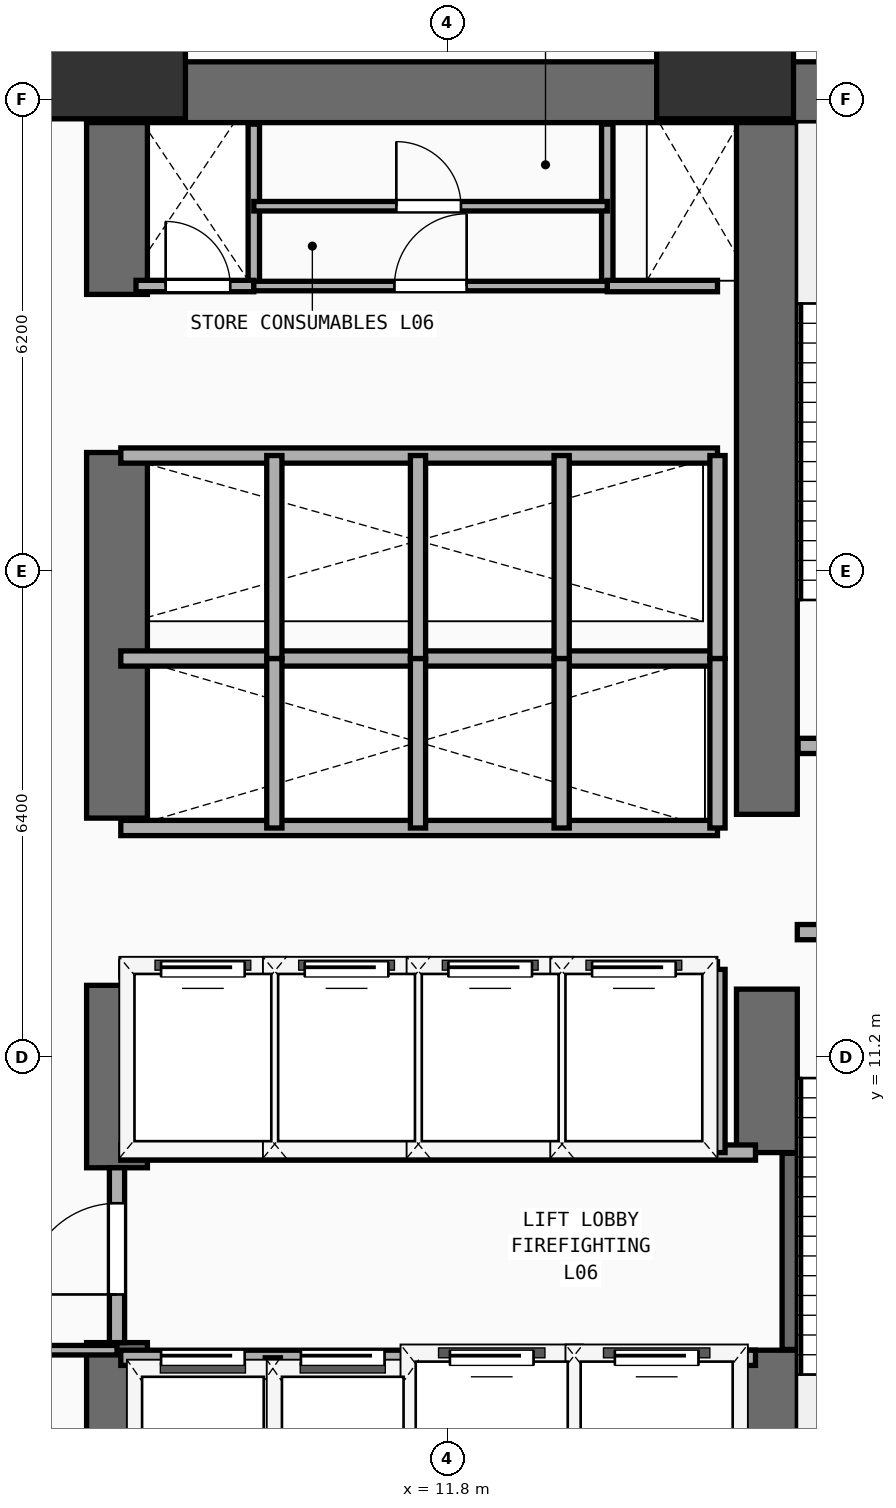
"""IFC4 building model, lengths in metres.
Left out: names, types, materials, properties, quantities, classifications, styles, units other than length and angle.
Written with IfcOpenShell. Run it as: python <this file> out.ifc"""

import sys

from ifc_helpers import new_model, si_unit, direction, frame, frame_2d, origin, origin_2d, place, context, subcontext, project, spatial, rectangle, extrude, element, fill, save


model = new_model("IFC4")
c1 = context("Model", 3, precision=1e-05, world=origin(), true_north=direction((0.0, 1.0)))
c2 = subcontext(c1, "Body", "Model", "MODEL_VIEW")
j1 = project(units=[si_unit("LENGTHUNIT", "METRE"), si_unit("PLANEANGLEUNIT", "RADIAN")], contexts=[c1])
p1 = place(None, origin())
s1 = spatial("IfcSite", under=j1, at=p1, CompositionType="ELEMENT")
p2 = place(p1, origin())
s2 = spatial("IfcBuilding", under=s1, at=p2, CompositionType="ELEMENT")
p3 = place(p2, frame((0.0, 0.0, 24.8)))
s3 = spatial("IfcBuildingStorey", under=s2, at=p3, CompositionType="ELEMENT", Elevation=24.8)
p4 = place(p3, frame((7.05, 23.9, 0.0), z_axis=(0.0, 0.0, 1.0), x_axis=(1.0, 0.0, 0.0)))
e1 = element("IfcWall", 1, at=p4, inside=s3, PredefinedType="SHEAR", context=c2, shape_type="SweptSolid", body=[
    extrude(rectangle(XDim=14.15, YDim=0.8, at=frame_2d((7.075, 0.0))), origin(), (0.0, 0.0, 1.0), 4.35),
])
p5 = place(p3, frame((7.45, 4.65, 0.0), z_axis=(0.0, 0.0, 1.0), x_axis=(0.0, 1.0, 0.0)))
e2 = element("IfcWall", 2, at=p5, inside=s3, PredefinedType="SHEAR", context=c2, shape_type="SweptSolid", body=[
    extrude(rectangle(XDim=2.8, YDim=0.8, at=frame_2d((1.4, 0.0))), origin(), (0.0, 0.0, 1.0), 4.35),
])
p6 = place(p3, frame((7.45, 9.75, 0.0), z_axis=(0.0, 0.0, 1.0), x_axis=(0.0, 1.0, 0.0)))
e3 = element("IfcWall", 3, at=p6, inside=s3, PredefinedType="SHEAR", context=c2, shape_type="SweptSolid", body=[
    extrude(rectangle(XDim=2.4, YDim=0.8, at=frame_2d((1.2, 0.0))), origin(), (0.0, 0.0, 1.0), 4.35),
])
p7 = place(p3, frame((7.45, 14.35, 0.0), z_axis=(0.0, 0.0, 1.0), x_axis=(0.0, 1.0, 0.0)))
e4 = element("IfcWall", 4, at=p7, inside=s3, PredefinedType="SHEAR", context=c2, shape_type="SweptSolid", body=[
    extrude(rectangle(XDim=4.81, YDim=0.8, at=frame_2d((2.405, 0.0))), origin(), (0.0, 0.0, 1.0), 4.35),
])
p8 = place(p3, frame((7.45, 21.24, 0.0), z_axis=(0.0, 0.0, 1.0), x_axis=(0.0, 1.0, 0.0)))
e5 = element("IfcWall", 5, at=p8, inside=s3, PredefinedType="SHEAR", context=c2, shape_type="SweptSolid", body=[
    extrude(rectangle(XDim=2.26, YDim=0.8, at=frame_2d((1.13, 0.0))), origin(), (0.0, 0.0, 1.0), 4.35),
])
p9 = place(p3, frame((16.0, 4.65, 0.0), z_axis=(0.0, 0.0, 1.0), x_axis=(0.0, 1.0, 0.0)))
e6 = element("IfcWall", 6, at=p9, inside=s3, PredefinedType="SHEAR", context=c2, shape_type="SweptSolid", body=[
    extrude(rectangle(XDim=2.7, YDim=0.8, at=frame_2d((1.35, 0.0))), origin(), (0.0, 0.0, 1.0), 4.35),
])
p10 = place(p3, frame((16.0, 9.95, 0.0), z_axis=(0.0, 0.0, 1.0), x_axis=(0.0, 1.0, 0.0)))
e7 = element("IfcWall", 7, at=p10, inside=s3, PredefinedType="SHEAR", context=c2, shape_type="SweptSolid", body=[
    extrude(rectangle(XDim=2.15, YDim=0.8, at=frame_2d((1.075, 0.0))), origin(), (0.0, 0.0, 1.0), 4.35),
])
p11 = place(p3, frame((16.0, 14.4, 0.0), z_axis=(0.0, 0.0, 1.0), x_axis=(0.0, 1.0, 0.0)))
e8 = element("IfcWall", 8, at=p11, inside=s3, PredefinedType="SHEAR", context=c2, shape_type="SweptSolid", body=[
    extrude(rectangle(XDim=9.1, YDim=0.8, at=frame_2d((4.55, 0.0))), origin(), (0.0, 0.0, 1.0), 4.35),
])
for number, where, z_axis, x_axis in (
    (9, (7.45, 24.45, 0.0), (0.0, 0.0, 1.0), (1.0, 0.0, 0.0)),
    (10, (15.45, 24.45, 0.0), (0.0, 0.0, 1.0), (1.0, 0.0, 0.0)),
):
    element("IfcColumn", number, at=place(p3, frame(where, z_axis=z_axis, x_axis=x_axis)), inside=s3, PredefinedType="COLUMN", context=c2, shape_type="SweptSolid", body=[
        extrude(rectangle(XDim=1.8, YDim=1.8, at=origin_2d()), origin(), (0.0, 0.0, 1.0), 4.35),
    ])
p12 = place(p3, frame((16.3, 7.36, 0.0), z_axis=(0.0, 0.0, 1.0), x_axis=(0.0, 1.0, 0.0)))
e11 = element("IfcWall", 11, at=p12, inside=s3, PredefinedType="SHEAR", context=c2, shape_type="SweptSolid", body=[
    extrude(rectangle(XDim=2.58, YDim=0.2, at=frame_2d((1.29, 0.0))), origin(), (0.0, 0.0, 1.0), 4.35),
])
p13 = place(p3, frame((16.4, 12.85, 0.0), z_axis=(0.0, 0.0, 1.0), x_axis=(1.0, 0.0, 0.0)))
e12 = element("IfcWall", 12, at=p13, inside=s3, PredefinedType="PARTITIONING", context=c2, shape_type="SweptSolid", body=[
    extrude(rectangle(XDim=3.96, YDim=0.2, at=frame_2d((1.98, 0.0))), origin(), (0.0, 0.0, 1.0), 4.35),
])
p14 = place(p13, frame((1.304, 0.0, 0.0)))
e13 = element("IfcOpeningElement", 13, at=p14, cuts=e12, PredefinedType="OPENING", context=c2, shape_type="SweptSolid", body=[
    extrude(rectangle(XDim=1.1, YDim=2.2, at=frame_2d((0.55, 1.1))), frame((0.0, 0.11, 0.0), z_axis=(0.0, -1.0, 0.0), x_axis=(1.0, 0.0, 0.0)), (0.0, 0.0, 1.0), 0.22),
])
p15 = place(p3, frame((16.41, 15.3, 0.0), z_axis=(0.0, 0.0, 1.0), x_axis=(1.0, 0.0, 0.0)))
e14 = element("IfcWall", 14, at=p15, inside=s3, PredefinedType="PARTITIONING", context=c2, shape_type="SweptSolid", body=[
    extrude(rectangle(XDim=3.95, YDim=0.2, at=frame_2d((1.975, 0.0))), origin(), (0.0, 0.0, 1.0), 4.35),
])
p16 = place(p15, frame((1.294, 0.0, 0.0)))
e15 = element("IfcOpeningElement", 15, at=p16, cuts=e14, PredefinedType="OPENING", context=c2, shape_type="SweptSolid", body=[
    extrude(rectangle(XDim=1.1, YDim=2.2, at=frame_2d((0.55, 1.1))), frame((0.0, 0.11, 0.0), z_axis=(0.0, -1.0, 0.0), x_axis=(1.0, 0.0, 0.0)), (0.0, 0.0, 1.0), 0.22),
])
p17 = place(p3, frame((7.5, 7.25, 0.0), z_axis=(0.0, 0.0, 1.0), x_axis=(1.0, 0.0, 0.0)))
e16 = element("IfcWall", 16, at=p17, inside=s3, PredefinedType="PARTITIONING", context=c2, shape_type="SweptSolid", body=[
    extrude(rectangle(XDim=8.35, YDim=0.2, at=frame_2d((4.175, 0.0))), origin(), (0.0, 0.0, 1.0), 4.35),
])
p18 = place(p17, frame((0.53, 0.0, 0.0)))
e17 = element("IfcOpeningElement", 17, at=p18, cuts=e16, PredefinedType="OPENING", context=c2, shape_type="SweptSolid", body=[
    extrude(rectangle(XDim=1.1, YDim=2.2, at=frame_2d((0.55, 1.1))), frame((0.0, 0.11, 0.0), z_axis=(0.0, -1.0, 0.0), x_axis=(1.0, 0.0, 0.0)), (0.0, 0.0, 1.0), 0.22),
])
p19 = place(p17, frame((2.37, 0.0, 0.0)))
e18 = element("IfcOpeningElement", 18, at=p19, cuts=e16, PredefinedType="OPENING", context=c2, shape_type="SweptSolid", body=[
    extrude(rectangle(XDim=1.1, YDim=2.2, at=frame_2d((0.55, 1.1))), frame((0.0, 0.11, 0.0), z_axis=(0.0, -1.0, 0.0), x_axis=(1.0, 0.0, 0.0)), (0.0, 0.0, 1.0), 0.22),
])
p20 = place(p17, frame((4.33, 0.0, 0.0)))
e19 = element("IfcOpeningElement", 19, at=p20, cuts=e16, PredefinedType="OPENING", context=c2, shape_type="SweptSolid", body=[
    extrude(rectangle(XDim=1.1, YDim=2.2, at=frame_2d((0.55, 1.1))), frame((0.0, 0.11, 0.0), z_axis=(0.0, -1.0, 0.0), x_axis=(1.0, 0.0, 0.0)), (0.0, 0.0, 1.0), 0.22),
])
p21 = place(p17, frame((6.5, 0.0, 0.0)))
e20 = element("IfcOpeningElement", 20, at=p21, cuts=e16, PredefinedType="OPENING", context=c2, shape_type="SweptSolid", body=[
    extrude(rectangle(XDim=1.1, YDim=2.2, at=frame_2d((0.55, 1.1))), frame((0.0, 0.11, 0.0), z_axis=(0.0, -1.0, 0.0), x_axis=(1.0, 0.0, 0.0)), (0.0, 0.0, 1.0), 0.22),
])
p22 = place(p3, frame((7.5, 9.95, 0.0), z_axis=(0.0, 0.0, 1.0), x_axis=(1.0, 0.0, 0.0)))
e21 = element("IfcWall", 21, at=p22, inside=s3, PredefinedType="PARTITIONING", context=c2, shape_type="SweptSolid", body=[
    extrude(rectangle(XDim=8.35, YDim=0.2, at=frame_2d((4.175, 0.0))), origin(), (0.0, 0.0, 1.0), 4.35),
])
for number, where, z_axis, x_axis in (
    (22, (9.5, 4.45, 0.0), (0.0, 0.0, 1.0), (0.0, 1.0, 0.0)),
    (23, (11.36, 4.45, 0.0), (0.0, 0.0, 1.0), (0.0, 1.0, 0.0)),
    (24, (13.46, 4.45, 0.0), (0.0, 0.0, 1.0), (0.0, 1.0, 0.0)),
):
    element("IfcWall", number, at=place(p3, frame(where, z_axis=z_axis, x_axis=x_axis)), inside=s3, PredefinedType="PARTITIONING", context=c2, shape_type="SweptSolid", body=[
        extrude(rectangle(XDim=2.8, YDim=0.2, at=frame_2d((1.4, 0.0))), origin(), (0.0, 0.0, 1.0), 4.35),
    ])
p23 = place(p3, frame((7.45, 7.45, 0.0), z_axis=(0.0, 0.0, 1.0), x_axis=(0.0, 1.0, 0.0)))
e25 = element("IfcWall", 25, at=p23, inside=s3, PredefinedType="PARTITIONING", context=c2, shape_type="SweptSolid", body=[
    extrude(rectangle(XDim=2.3, YDim=0.2, at=frame_2d((1.15, 0.0))), origin(), (0.0, 0.0, 1.0), 3.13),
])
p24 = place(p23, frame((0.633, 0.0, 0.0)))
e26 = element("IfcOpeningElement", 26, at=p24, cuts=e25, PredefinedType="OPENING", context=c2, shape_type="SweptSolid", body=[
    extrude(rectangle(XDim=1.2, YDim=2.25, at=frame_2d((0.6, 1.125))), frame((0.0, 0.11, 0.0), z_axis=(0.0, -1.0, 0.0), x_axis=(1.0, 0.0, 0.0)), (0.0, 0.0, 1.0), 0.22),
])
p25 = place(p3, frame((7.5, 12.36, 0.0), z_axis=(0.0, 0.0, 1.0), x_axis=(1.0, 0.0, 0.0)))
e27 = element("IfcWall", 27, at=p25, inside=s3, PredefinedType="PARTITIONING", context=c2, shape_type="SweptSolid", body=[
    extrude(rectangle(XDim=7.85, YDim=0.2, at=frame_2d((3.925, 0.0))), origin(), (0.0, 0.0, 1.0), 4.35),
])
p26 = place(p25, frame((0.53, 0.0, 0.0)))
e28 = element("IfcOpeningElement", 28, at=p26, cuts=e27, PredefinedType="OPENING", context=c2, shape_type="SweptSolid", body=[
    extrude(rectangle(XDim=1.1, YDim=2.2, at=frame_2d((0.55, 1.1))), frame((0.0, 0.11, 0.0), z_axis=(0.0, -1.0, 0.0), x_axis=(1.0, 0.0, 0.0)), (0.0, 0.0, 1.0), 0.22),
])
p27 = place(p25, frame((2.42, 0.0, 0.0)))
e29 = element("IfcOpeningElement", 29, at=p27, cuts=e27, PredefinedType="OPENING", context=c2, shape_type="SweptSolid", body=[
    extrude(rectangle(XDim=1.1, YDim=2.2, at=frame_2d((0.55, 1.1))), frame((0.0, 0.11, 0.0), z_axis=(0.0, -1.0, 0.0), x_axis=(1.0, 0.0, 0.0)), (0.0, 0.0, 1.0), 0.22),
])
p28 = place(p25, frame((4.31, 0.0, 0.0)))
e30 = element("IfcOpeningElement", 30, at=p28, cuts=e27, PredefinedType="OPENING", context=c2, shape_type="SweptSolid", body=[
    extrude(rectangle(XDim=1.1, YDim=2.2, at=frame_2d((0.55, 1.1))), frame((0.0, 0.11, 0.0), z_axis=(0.0, -1.0, 0.0), x_axis=(1.0, 0.0, 0.0)), (0.0, 0.0, 1.0), 0.22),
])
p29 = place(p25, frame((6.2, 0.0, 0.0)))
e31 = element("IfcOpeningElement", 31, at=p29, cuts=e27, PredefinedType="OPENING", context=c2, shape_type="SweptSolid", body=[
    extrude(rectangle(XDim=1.1, YDim=2.2, at=frame_2d((0.55, 1.1))), frame((0.0, 0.11, 0.0), z_axis=(0.0, -1.0, 0.0), x_axis=(1.0, 0.0, 0.0)), (0.0, 0.0, 1.0), 0.22),
])
for number, where, z_axis, x_axis in (
    (32, (15.35, 9.95, 0.0), (0.0, 0.0, 1.0), (0.0, 1.0, 0.0)),
    (33, (9.52, 9.95, 0.0), (0.0, 0.0, 1.0), (0.0, 1.0, 0.0)),
    (34, (11.41, 9.95, 0.0), (0.0, 0.0, 1.0), (0.0, 1.0, 0.0)),
    (35, (13.3, 9.95, 0.0), (0.0, 0.0, 1.0), (0.0, 1.0, 0.0)),
):
    element("IfcWall", number, at=place(p3, frame(where, z_axis=z_axis, x_axis=x_axis)), inside=s3, PredefinedType="PARTITIONING", context=c2, shape_type="SweptSolid", body=[
        extrude(rectangle(XDim=2.41, YDim=0.2, at=frame_2d((1.205, 0.0))), origin(), (0.0, 0.0, 1.0), 4.35),
    ])
for number, where, z_axis, x_axis in (
    (36, (7.5, 14.22, 0.0), (0.0, 0.0, 1.0), (1.0, 0.0, 0.0)),
    (37, (7.5, 16.45, 0.0), (0.0, 0.0, 1.0), (1.0, 0.0, 0.0)),
):
    element("IfcWall", number, at=place(p3, frame(where, z_axis=z_axis, x_axis=x_axis)), inside=s3, PredefinedType="PARTITIONING", context=c2, shape_type="SweptSolid", body=[
        extrude(rectangle(XDim=7.85, YDim=0.2, at=frame_2d((3.925, 0.0))), origin(), (0.0, 0.0, 1.0), 4.35),
    ])
for number, where, z_axis, x_axis in (
    (38, (15.35, 14.22, 0.0), (0.0, 0.0, 1.0), (0.0, 1.0, 0.0)),
    (39, (9.52, 14.22, 0.0), (0.0, 0.0, 1.0), (0.0, 1.0, 0.0)),
    (40, (11.41, 14.22, 0.0), (0.0, 0.0, 1.0), (0.0, 1.0, 0.0)),
    (41, (13.3, 14.22, 0.0), (0.0, 0.0, 1.0), (0.0, 1.0, 0.0)),
):
    element("IfcWall", number, at=place(p3, frame(where, z_axis=z_axis, x_axis=x_axis)), inside=s3, PredefinedType="PARTITIONING", context=c2, shape_type="SweptSolid", body=[
        extrude(rectangle(XDim=2.23, YDim=0.2, at=frame_2d((1.115, 0.0))), origin(), (0.0, 0.0, 1.0), 4.35),
    ])
p30 = place(p3, frame((7.5, 19.12, 0.0), z_axis=(0.0, 0.0, 1.0), x_axis=(1.0, 0.0, 0.0)))
e42 = element("IfcWall", 42, at=p30, inside=s3, PredefinedType="PARTITIONING", context=c2, shape_type="SweptSolid", body=[
    extrude(rectangle(XDim=7.85, YDim=0.2, at=frame_2d((3.925, 0.0))), origin(), (0.0, 0.0, 1.0), 4.35),
])
for number, where, z_axis, x_axis in (
    (43, (15.35, 16.45, 0.0), (0.0, 0.0, 1.0), (0.0, 1.0, 0.0)),
    (44, (9.52, 16.45, 0.0), (0.0, 0.0, 1.0), (0.0, 1.0, 0.0)),
    (45, (11.41, 16.45, 0.0), (0.0, 0.0, 1.0), (0.0, 1.0, 0.0)),
    (46, (13.3, 16.45, 0.0), (0.0, 0.0, 1.0), (0.0, 1.0, 0.0)),
):
    element("IfcWall", number, at=place(p3, frame(where, z_axis=z_axis, x_axis=x_axis)), inside=s3, PredefinedType="PARTITIONING", context=c2, shape_type="SweptSolid", body=[
        extrude(rectangle(XDim=2.67, YDim=0.2, at=frame_2d((1.335, 0.0))), origin(), (0.0, 0.0, 1.0), 4.35),
    ])
for number, where, z_axis, x_axis in (
    (47, (9.25, 21.35, 0.0), (0.0, 0.0, 1.0), (0.0, 1.0, 0.0)),
    (48, (13.9, 21.35, 0.0), (0.0, 0.0, 1.0), (0.0, 1.0, 0.0)),
):
    element("IfcWall", number, at=place(p3, frame(where, z_axis=z_axis, x_axis=x_axis)), inside=s3, PredefinedType="PARTITIONING", context=c2, shape_type="SweptSolid", body=[
        extrude(rectangle(XDim=2.13, YDim=0.15, at=frame_2d((1.065, 0.0))), origin(), (0.0, 0.0, 1.0), 4.35),
    ])
p31 = place(p3, frame((7.7, 21.35, 0.0), z_axis=(0.0, 0.0, 1.0), x_axis=(1.0, 0.0, 0.0)))
e49 = element("IfcWall", 49, at=p31, inside=s3, PredefinedType="PARTITIONING", context=c2, shape_type="SweptSolid", body=[
    extrude(rectangle(XDim=1.55, YDim=0.15, at=frame_2d((0.775, 0.0))), origin(), (0.0, 0.0, 1.0), 4.35),
])
p32 = place(p31, frame((0.39, 0.0, 0.0)))
e50 = element("IfcOpeningElement", 50, at=p32, cuts=e49, PredefinedType="OPENING", context=c2, shape_type="SweptSolid", body=[
    extrude(rectangle(XDim=0.85, YDim=2.15, at=frame_2d((0.425, 1.075))), frame((0.0, 0.085, 0.0), z_axis=(0.0, -1.0, 0.0), x_axis=(1.0, 0.0, 0.0)), (0.0, 0.0, 1.0), 0.17),
])
p33 = place(p3, frame((13.9, 21.35, 0.0), z_axis=(0.0, 0.0, 1.0), x_axis=(1.0, 0.0, 0.0)))
e51 = element("IfcWall", 51, at=p33, inside=s3, PredefinedType="PARTITIONING", context=c2, shape_type="SweptSolid", body=[
    extrude(rectangle(XDim=1.45, YDim=0.15, at=frame_2d((0.725, 0.0))), origin(), (0.0, 0.0, 1.0), 4.35),
])
p34 = place(p3, frame((9.25, 21.35, 0.0), z_axis=(0.0, 0.0, 1.0), x_axis=(1.0, 0.0, 0.0)))
e52 = element("IfcWall", 52, at=p34, inside=s3, PredefinedType="PARTITIONING", context=c2, shape_type="SweptSolid", body=[
    extrude(rectangle(XDim=4.65, YDim=0.125, at=frame_2d((2.325, 0.0))), origin(), (0.0, 0.0, 1.0), 4.35),
])
p35 = place(p34, frame((1.85, 0.0, 0.0)))
e53 = element("IfcOpeningElement", 53, at=p35, cuts=e52, PredefinedType="OPENING", context=c2, shape_type="SweptSolid", body=[
    extrude(rectangle(XDim=0.95, YDim=2.15, at=frame_2d((0.475, 1.075))), frame((0.0, 0.073, 0.0), z_axis=(0.0, -1.0, 0.0), x_axis=(1.0, 0.0, 0.0)), (0.0, 0.0, 1.0), 0.145),
])
p36 = place(p3, frame((9.25, 22.4, 0.0), z_axis=(0.0, 0.0, 1.0), x_axis=(1.0, 0.0, 0.0)))
e54 = element("IfcWall", 54, at=p36, inside=s3, PredefinedType="PARTITIONING", context=c2, shape_type="SweptSolid", body=[
    extrude(rectangle(XDim=4.65, YDim=0.125, at=frame_2d((2.325, 0.0))), origin(), (0.0, 0.0, 1.0), 4.35),
])
p37 = place(p36, frame((1.875, 0.0, 0.0)))
e55 = element("IfcOpeningElement", 55, at=p37, cuts=e54, PredefinedType="OPENING", context=c2, shape_type="SweptSolid", body=[
    extrude(rectangle(XDim=0.85, YDim=2.15, at=frame_2d((0.425, 1.075))), frame((0.0, 0.073, 0.0), z_axis=(0.0, -1.0, 0.0), x_axis=(1.0, 0.0, 0.0)), (0.0, 0.0, 1.0), 0.145),
])
p38 = place(p3, frame((0.42, 7.35, 0.0), z_axis=(0.0, 0.0, 1.0), x_axis=(1.0, 0.0, 0.0)))
e56 = element("IfcWall", 56, at=p38, inside=s3, PredefinedType="PARTITIONING", context=c2, shape_type="SweptSolid", body=[
    extrude(rectangle(XDim=7.03, YDim=0.125, at=frame_2d((3.515, 0.0))), origin(), (0.0, 0.0, 1.0), 4.35),
])
p39 = place(p38, frame((4.78, 0.0, 0.0)))
e57 = element("IfcOpeningElement", 57, at=p39, cuts=e56, PredefinedType="OPENING", context=c2, shape_type="SweptSolid", body=[
    extrude(rectangle(XDim=0.95, YDim=2.15, at=frame_2d((0.475, 1.075))), frame((0.0, 0.073, 0.0), z_axis=(0.0, -1.0, 0.0), x_axis=(1.0, 0.0, 0.0)), (0.0, 0.0, 1.0), 0.145),
])
p40 = place(p18, origin())
e58 = element("IfcDoor", 58, at=p40, inside=s3, OperationType="SLIDING_TO_LEFT", PredefinedType="DOOR", context=c2, shape_type="SweptSolid", body=[
    extrude(rectangle(XDim=1.1, YDim=2.2, at=frame_2d((0.55, 1.1))), frame((0.0, 0.025, 0.0), z_axis=(0.0, -1.0, 0.0), x_axis=(1.0, 0.0, 0.0)), (0.0, 0.0, 1.0), 0.05),
])
fill(e17, e58)
p41 = place(p19, origin())
e59 = element("IfcDoor", 59, at=p41, inside=s3, OperationType="SLIDING_TO_LEFT", PredefinedType="DOOR", context=c2, shape_type="SweptSolid", body=[
    extrude(rectangle(XDim=1.1, YDim=2.2, at=frame_2d((0.55, 1.1))), frame((0.0, 0.025, 0.0), z_axis=(0.0, -1.0, 0.0), x_axis=(1.0, 0.0, 0.0)), (0.0, 0.0, 1.0), 0.05),
])
fill(e18, e59)
p42 = place(p20, origin())
e60 = element("IfcDoor", 60, at=p42, inside=s3, OperationType="SLIDING_TO_LEFT", PredefinedType="DOOR", context=c2, shape_type="SweptSolid", body=[
    extrude(rectangle(XDim=1.1, YDim=2.2, at=frame_2d((0.55, 1.1))), frame((0.0, 0.025, 0.0), z_axis=(0.0, -1.0, 0.0), x_axis=(1.0, 0.0, 0.0)), (0.0, 0.0, 1.0), 0.05),
])
fill(e19, e60)
p43 = place(p21, origin())
e61 = element("IfcDoor", 61, at=p43, inside=s3, OperationType="SLIDING_TO_LEFT", PredefinedType="DOOR", context=c2, shape_type="SweptSolid", body=[
    extrude(rectangle(XDim=1.1, YDim=2.2, at=frame_2d((0.55, 1.1))), frame((0.0, 0.025, 0.0), z_axis=(0.0, -1.0, 0.0), x_axis=(1.0, 0.0, 0.0)), (0.0, 0.0, 1.0), 0.05),
])
fill(e20, e61)
p44 = place(p24, frame((1.2, 0.0, 0.0), z_axis=(0.0, 0.0, 1.0), x_axis=(-1.0, 0.0, 0.0)))
e62 = element("IfcDoor", 62, at=p44, inside=s3, OperationType="SINGLE_SWING_RIGHT", PredefinedType="DOOR", context=c2, shape_type="SweptSolid", body=[
    extrude(rectangle(XDim=1.2, YDim=2.25, at=frame_2d((0.6, 1.125))), frame((0.0, 0.025, 0.0), z_axis=(0.0, -1.0, 0.0), x_axis=(1.0, 0.0, 0.0)), (0.0, 0.0, 1.0), 0.05),
])
fill(e26, e62)
p45 = place(p26, origin())
e63 = element("IfcDoor", 63, at=p45, inside=s3, OperationType="SLIDING_TO_LEFT", PredefinedType="DOOR", context=c2, shape_type="SweptSolid", body=[
    extrude(rectangle(XDim=1.1, YDim=2.2, at=frame_2d((0.55, 1.1))), frame((0.0, 0.025, 0.0), z_axis=(0.0, -1.0, 0.0), x_axis=(1.0, 0.0, 0.0)), (0.0, 0.0, 1.0), 0.05),
])
fill(e28, e63)
p46 = place(p27, origin())
e64 = element("IfcDoor", 64, at=p46, inside=s3, OperationType="SLIDING_TO_LEFT", PredefinedType="DOOR", context=c2, shape_type="SweptSolid", body=[
    extrude(rectangle(XDim=1.1, YDim=2.2, at=frame_2d((0.55, 1.1))), frame((0.0, 0.025, 0.0), z_axis=(0.0, -1.0, 0.0), x_axis=(1.0, 0.0, 0.0)), (0.0, 0.0, 1.0), 0.05),
])
fill(e29, e64)
p47 = place(p28, origin())
e65 = element("IfcDoor", 65, at=p47, inside=s3, OperationType="SLIDING_TO_LEFT", PredefinedType="DOOR", context=c2, shape_type="SweptSolid", body=[
    extrude(rectangle(XDim=1.1, YDim=2.2, at=frame_2d((0.55, 1.1))), frame((0.0, 0.025, 0.0), z_axis=(0.0, -1.0, 0.0), x_axis=(1.0, 0.0, 0.0)), (0.0, 0.0, 1.0), 0.05),
])
fill(e30, e65)
p48 = place(p29, origin())
e66 = element("IfcDoor", 66, at=p48, inside=s3, OperationType="SLIDING_TO_LEFT", PredefinedType="DOOR", context=c2, shape_type="SweptSolid", body=[
    extrude(rectangle(XDim=1.1, YDim=2.2, at=frame_2d((0.55, 1.1))), frame((0.0, 0.025, 0.0), z_axis=(0.0, -1.0, 0.0), x_axis=(1.0, 0.0, 0.0)), (0.0, 0.0, 1.0), 0.05),
])
fill(e31, e66)
p49 = place(p32, origin())
e67 = element("IfcDoor", 67, at=p49, inside=s3, OperationType="SINGLE_SWING_LEFT", PredefinedType="DOOR", context=c2, shape_type="SweptSolid", body=[
    extrude(rectangle(XDim=0.85, YDim=2.15, at=frame_2d((0.425, 1.075))), frame((0.0, 0.025, 0.0), z_axis=(0.0, -1.0, 0.0), x_axis=(1.0, 0.0, 0.0)), (0.0, 0.0, 1.0), 0.05),
])
fill(e50, e67)
p50 = place(p35, origin())
e68 = element("IfcDoor", 68, at=p50, inside=s3, OperationType="SINGLE_SWING_RIGHT", PredefinedType="DOOR", context=c2, shape_type="SweptSolid", body=[
    extrude(rectangle(XDim=0.95, YDim=2.15, at=frame_2d((0.475, 1.075))), frame((0.0, 0.025, 0.0), z_axis=(0.0, -1.0, 0.0), x_axis=(1.0, 0.0, 0.0)), (0.0, 0.0, 1.0), 0.05),
])
fill(e53, e68)
p51 = place(p37, origin())
e69 = element("IfcDoor", 69, at=p51, inside=s3, OperationType="SINGLE_SWING_LEFT", PredefinedType="DOOR", context=c2, shape_type="SweptSolid", body=[
    extrude(rectangle(XDim=0.85, YDim=2.15, at=frame_2d((0.425, 1.075))), frame((0.0, 0.025, 0.0), z_axis=(0.0, -1.0, 0.0), x_axis=(1.0, 0.0, 0.0)), (0.0, 0.0, 1.0), 0.05),
])
fill(e55, e69)
save(model, sys.argv[1])
